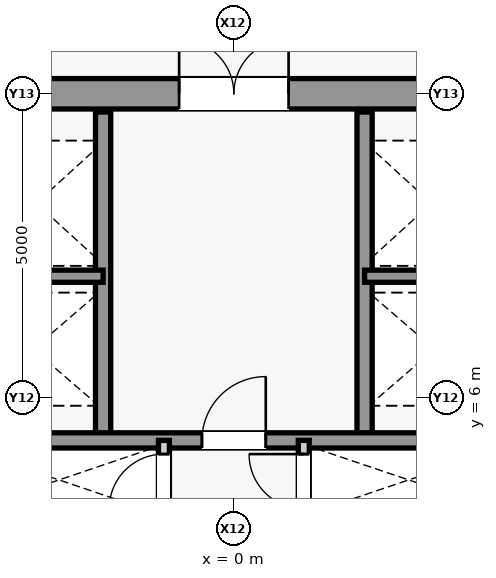
"""IFC4 building model, lengths in metres.
Left out: names, types, materials, properties, quantities, classifications, styles, units other than length and angle.
Written with IfcOpenShell. Run it as: python <this file> out.ifc"""

import sys

from ifc_helpers import new_model, si_unit, direction, frame, frame_2d, origin, place, context, subcontext, project, spatial, rectangle, extrude, source, transform, mapped, element, fill, save


model = new_model("IFC4")
c1 = context("Model", 3, precision=1e-05, world=origin(), true_north=direction((0.0, 1.0)))
c2 = subcontext(c1, "Body", "Model", "MODEL_VIEW")
j1 = project(units=[si_unit("LENGTHUNIT", "METRE"), si_unit("PLANEANGLEUNIT", "RADIAN")], contexts=[c1])
p1 = place(None, origin())
s1 = spatial("IfcSite", under=j1, at=p1, CompositionType="ELEMENT")
p2 = place(p1, origin())
s2 = spatial("IfcBuilding", under=s1, at=p2, CompositionType="ELEMENT")
p3 = place(p2, frame((0.0, 0.0, 149.9)))
s3 = spatial("IfcBuildingStorey", under=s2, at=p3, CompositionType="ELEMENT", Elevation=149.9)
m1 = source(origin(), c2, "Body", "SweptSolid", [
    extrude(rectangle(XDim=9.2, YDim=0.5, at=frame_2d((4.6, 0.0))), origin(), (0.0, 0.0, 1.0), 4.98),
])
p4 = place(p3, frame((-4.6, 11.0, 0.0), z_axis=(0.0, 0.0, 1.0), x_axis=(1.0, 0.0, 0.0)))
e1 = element("IfcWall", 1, at=p4, inside=s3, PredefinedType="SHEAR", context=c2, shape_type="MappedRepresentation", body=[
    mapped(m1, transform((0.0, 0.0, 0.0), scale=1.0)),
])
m2 = source(origin(), c2, "Body", "SweptSolid", [
    extrude(rectangle(XDim=1.8, YDim=2.25, at=frame_2d((0.9, 1.125))), frame((0.0, 0.26, 0.0), z_axis=(0.0, -1.0, 0.0), x_axis=(1.0, 0.0, 0.0)), (0.0, 0.0, 1.0), 0.52),
])
p5 = place(p4, frame((3.7, 0.0, 0.0)))
e2 = element("IfcOpeningElement", 2, at=p5, cuts=e1, PredefinedType="OPENING", context=c2, shape_type="MappedRepresentation", body=[
    mapped(m2, transform((0.0, 0.0, 0.0), scale=1.0)),
])
m3 = source(origin(), c2, "Body", "SweptSolid", [
    extrude(rectangle(XDim=5.4, YDim=0.25, at=frame_2d((2.7, 0.0))), origin(), (0.0, 0.0, 1.0), 4.98),
])
for number, where, z_axis, x_axis in (
    (3, (-2.15, 5.3, 0.0), (0.0, 0.0, 1.0), (0.0, 1.0, 0.0)),
    (4, (2.15, 5.3, 0.0), (0.0, 0.0, 1.0), (0.0, 1.0, 0.0)),
):
    element("IfcWall", number, at=place(p3, frame(where, z_axis=z_axis, x_axis=x_axis)), inside=s3, PredefinedType="SHEAR", context=c2, shape_type="MappedRepresentation", body=[
        mapped(m3, transform((0.0, 0.0, 0.0), scale=1.0)),
    ])
m4 = source(origin(), c2, "Body", "SweptSolid", [
    extrude(rectangle(XDim=2.45, YDim=0.2, at=frame_2d((1.225, 0.0))), origin(), (0.0, 0.0, 1.0), 4.98),
])
for number, where, z_axis, x_axis in (
    (5, (-4.6, 8.0, 0.0), (0.0, 0.0, 1.0), (1.0, 0.0, 0.0)),
    (6, (2.15, 8.0, 0.0), (0.0, 0.0, 1.0), (1.0, 0.0, 0.0)),
):
    element("IfcWall", number, at=place(p3, frame(where, z_axis=z_axis, x_axis=x_axis)), inside=s3, PredefinedType="SHEAR", context=c2, shape_type="MappedRepresentation", body=[
        mapped(m4, transform((0.0, 0.0, 0.0), scale=1.0)),
    ])
m5 = source(origin(), c2, "Body", "SweptSolid", [
    extrude(rectangle(XDim=9.2, YDim=0.25, at=frame_2d((4.6, 0.0))), origin(), (0.0, 0.0, 1.0), 4.98),
])
p6 = place(p3, frame((-4.6, 5.3, 0.0), z_axis=(0.0, 0.0, 1.0), x_axis=(1.0, 0.0, 0.0)))
e7 = element("IfcWall", 7, at=p6, inside=s3, PredefinedType="SHEAR", context=c2, shape_type="MappedRepresentation", body=[
    mapped(m5, transform((0.0, 0.0, 0.0), scale=1.0)),
])
m6 = source(origin(), c2, "Body", "SweptSolid", [
    extrude(rectangle(XDim=1.05, YDim=2.2, at=frame_2d((0.525, 1.1))), frame((0.0, 0.135, 0.0), z_axis=(0.0, -1.0, 0.0), x_axis=(1.0, 0.0, 0.0)), (0.0, 0.0, 1.0), 0.27),
])
p7 = place(p6, frame((4.075, 0.0, 0.0)))
e8 = element("IfcOpeningElement", 8, at=p7, cuts=e7, PredefinedType="OPENING", context=c2, shape_type="MappedRepresentation", body=[
    mapped(m6, transform((0.0, 0.0, 0.0), scale=1.0)),
])
m7 = source(origin(), c2, "Body", "SweptSolid", [
    extrude(rectangle(XDim=10.6, YDim=0.18, at=frame_2d((5.3, 0.0))), origin(), (0.0, 0.0, 1.0), 4.98),
])
p8 = place(p3, frame((-1.15, -5.3, 0.0), z_axis=(0.0, 0.0, 1.0), x_axis=(0.0, 1.0, 0.0)))
e9 = element("IfcWall", 9, at=p8, inside=s3, PredefinedType="PARTITIONING", context=c2, shape_type="MappedRepresentation", body=[
    mapped(m7, transform((0.0, 0.0, 0.0), scale=1.0)),
])
m8 = source(origin(), c2, "Body", "SweptSolid", [
    extrude(rectangle(XDim=0.9, YDim=2.15, at=frame_2d((0.45, 1.075))), frame((0.0, 0.1, 0.0), z_axis=(0.0, -1.0, 0.0), x_axis=(1.0, 0.0, 0.0)), (0.0, 0.0, 1.0), 0.2),
])
p9 = place(p8, frame((1.9, 0.0, 0.0)))
e10 = element("IfcOpeningElement", 10, at=p9, cuts=e9, PredefinedType="OPENING", context=c2, shape_type="MappedRepresentation", body=[
    mapped(m8, transform((0.0, 0.0, 0.0), scale=1.0)),
])
p10 = place(p8, frame((6.55, 0.0, 0.0)))
e11 = element("IfcOpeningElement", 11, at=p10, cuts=e9, PredefinedType="OPENING", context=c2, shape_type="MappedRepresentation", body=[
    mapped(m8, transform((0.0, 0.0, 0.0), scale=1.0)),
])
p11 = place(p8, frame((9.475, 0.0, 0.0)))
e12 = element("IfcOpeningElement", 12, at=p11, cuts=e9, PredefinedType="OPENING", context=c2, shape_type="MappedRepresentation", body=[
    mapped(m8, transform((0.0, 0.0, 0.0), scale=1.0)),
])
p12 = place(p3, frame((1.15, -5.3, 0.0), z_axis=(0.0, 0.0, 1.0), x_axis=(0.0, 1.0, 0.0)))
e13 = element("IfcWall", 13, at=p12, inside=s3, PredefinedType="PARTITIONING", context=c2, shape_type="MappedRepresentation", body=[
    mapped(m7, transform((0.0, 0.0, 0.0), scale=1.0)),
])
p13 = place(p12, frame((0.85, 0.0, 0.0)))
e14 = element("IfcOpeningElement", 14, at=p13, cuts=e13, PredefinedType="OPENING", context=c2, shape_type="MappedRepresentation", body=[
    mapped(m8, transform((0.0, 0.0, 0.0), scale=1.0)),
])
p14 = place(p12, frame((3.55, 0.0, 0.0)))
e15 = element("IfcOpeningElement", 15, at=p14, cuts=e13, PredefinedType="OPENING", context=c2, shape_type="MappedRepresentation", body=[
    mapped(m8, transform((0.0, 0.0, 0.0), scale=1.0)),
])
p15 = place(p12, frame((6.3, 0.0, 0.0)))
e16 = element("IfcOpeningElement", 16, at=p15, cuts=e13, PredefinedType="OPENING", context=c2, shape_type="MappedRepresentation", body=[
    mapped(m8, transform((0.0, 0.0, 0.0), scale=1.0)),
])
p16 = place(p12, frame((8.25, 0.0, 0.0)))
e17 = element("IfcOpeningElement", 17, at=p16, cuts=e13, PredefinedType="OPENING", context=c2, shape_type="MappedRepresentation", body=[
    mapped(m8, transform((0.0, 0.0, 0.0), scale=1.0)),
])
p17 = place(p12, frame((9.475, 0.0, 0.0)))
e18 = element("IfcOpeningElement", 18, at=p17, cuts=e13, PredefinedType="OPENING", context=c2, shape_type="MappedRepresentation", body=[
    mapped(m8, transform((0.0, 0.0, 0.0), scale=1.0)),
])
m9 = source(origin(), c2, "Body", "SweptSolid", [
    extrude(rectangle(XDim=1.05, YDim=2.2, at=frame_2d((0.525, 1.1))), frame((0.0, 0.025, 0.0), z_axis=(0.0, -1.0, 0.0), x_axis=(1.0, 0.0, 0.0)), (0.0, 0.0, 1.0), 0.05),
])
p18 = place(p7, origin())
e19 = element("IfcDoor", 19, at=p18, inside=s3, OperationType="SINGLE_SWING_RIGHT", PredefinedType="DOOR", context=c2, shape_type="MappedRepresentation", body=[
    mapped(m9, transform((0.0, 0.0, 0.0), scale=1.0)),
])
fill(e8, e19)
m10 = source(origin(), c2, "Body", "SweptSolid", [
    extrude(rectangle(XDim=1.8, YDim=2.25, at=frame_2d((0.9, 1.125))), frame((0.0, 0.025, 0.0), z_axis=(0.0, -1.0, 0.0), x_axis=(1.0, 0.0, 0.0)), (0.0, 0.0, 1.0), 0.05),
])
p19 = place(p5, origin())
e20 = element("IfcDoor", 20, at=p19, inside=s3, OperationType="SINGLE_SWING_RIGHT", PredefinedType="DOOR", context=c2, shape_type="MappedRepresentation", body=[
    mapped(m10, transform((0.0, 0.0, 0.0), scale=1.0)),
])
fill(e2, e20)
m11 = source(origin(), c2, "Body", "SweptSolid", [
    extrude(rectangle(XDim=0.9, YDim=2.15, at=frame_2d((0.45, 1.075))), frame((0.0, 0.025, 0.0), z_axis=(0.0, -1.0, 0.0), x_axis=(1.0, 0.0, 0.0)), (0.0, 0.0, 1.0), 0.05),
])
p20 = place(p11, origin())
e21 = element("IfcDoor", 21, at=p20, inside=s3, OperationType="SINGLE_SWING_LEFT", PredefinedType="DOOR", context=c2, shape_type="MappedRepresentation", body=[
    mapped(m11, transform((0.0, 0.0, 0.0), scale=1.0)),
])
fill(e12, e21)
p21 = place(p17, origin())
e22 = element("IfcDoor", 22, at=p21, inside=s3, OperationType="SINGLE_SWING_RIGHT", PredefinedType="DOOR", context=c2, shape_type="MappedRepresentation", body=[
    mapped(m11, transform((0.0, 0.0, 0.0), scale=1.0)),
])
fill(e18, e22)
save(model, sys.argv[1])
